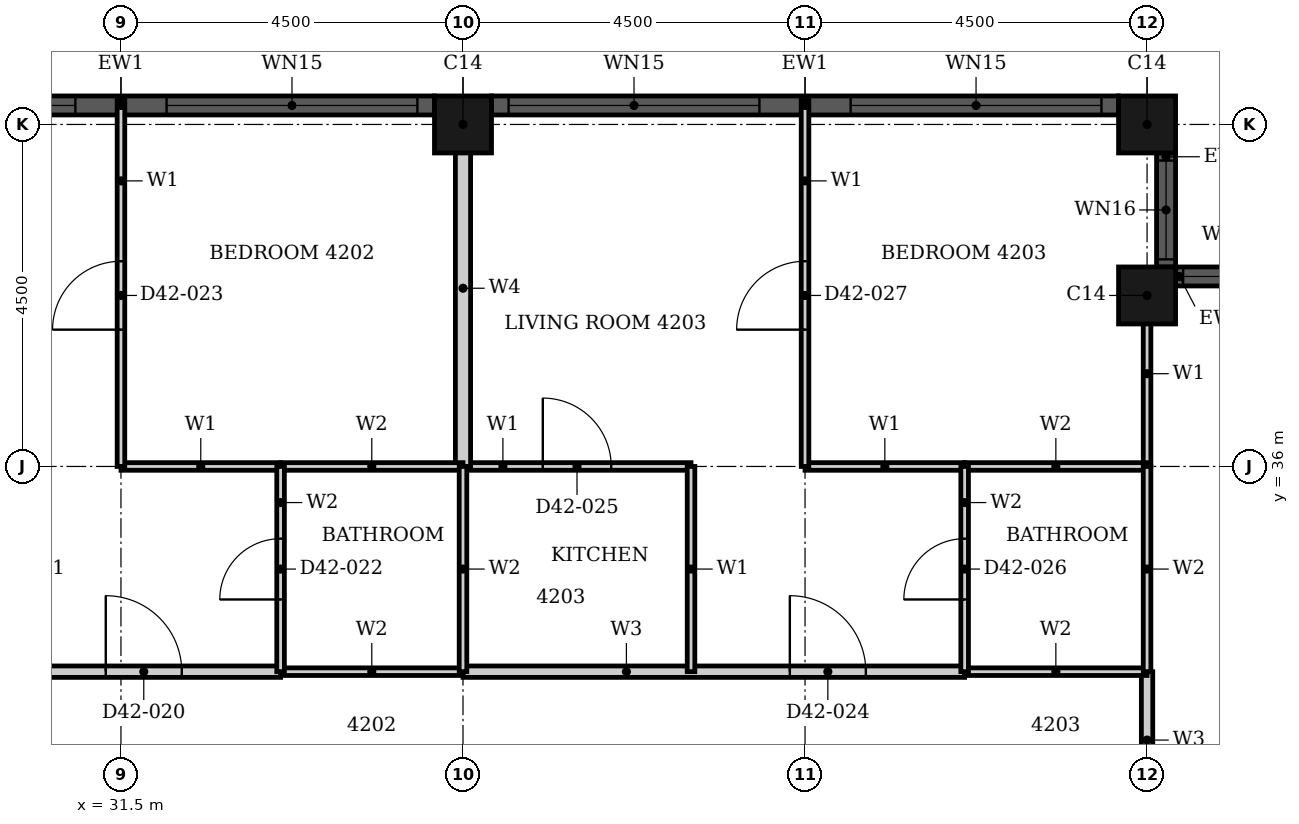
"""IFC4 building model, lengths in metres.
Left out: names, types, materials, properties, quantities, classifications, styles, units other than length and angle.
Written with IfcOpenShell. Run it as: python <this file> out.ifc"""

import sys

from ifc_helpers import new_model, si_unit, direction, frame, frame_2d, origin, origin_2d, place, context, subcontext, project, spatial, rectangle, hollow_rectangle, extrude, element, fill, save


model = new_model("IFC4")
c1 = context("Model", 3, precision=1e-05, world=origin(), true_north=direction((0.0, 1.0)))
c2 = subcontext(c1, "Body", "Model", "MODEL_VIEW")
j1 = project(units=[si_unit("LENGTHUNIT", "METRE"), si_unit("PLANEANGLEUNIT", "RADIAN")], contexts=[c1])
p1 = place(None, origin())
s1 = spatial("IfcSite", under=j1, at=p1, CompositionType="ELEMENT")
p2 = place(p1, origin())
s2 = spatial("IfcBuilding", under=s1, at=p2, CompositionType="ELEMENT")
p3 = place(p2, frame((0.0, 0.0, 169.1)))
s3 = spatial("IfcBuildingStorey", under=s2, at=p3, CompositionType="ELEMENT", Elevation=169.1)
for number, where, z_axis, x_axis in (
    (1, (45.0, 38.25, 0.0), (0.0, 0.0, 1.0), (1.0, 0.0, 0.0)),
    (2, (45.0, 40.5, 0.0), (0.0, 0.0, 1.0), (1.0, 0.0, 0.0)),
    (3, (36.0, 40.5, 0.0), (0.0, 0.0, 1.0), (1.0, 0.0, 0.0)),
):
    element("IfcColumn", number, at=place(p3, frame(where, z_axis=z_axis, x_axis=x_axis)), inside=s3, PredefinedType="COLUMN", context=c2, shape_type="SweptSolid", body=[
        extrude(hollow_rectangle(XDim=0.75, YDim=0.75, WallThickness=0.024, at=origin_2d()), origin(), (0.0, 0.0, 1.0), 3.7),
    ])
p4 = place(p3, frame((46.875, 38.5, 0.0), z_axis=(0.0, 0.0, 1.0), x_axis=(-1.0, 0.0, 0.0)))
e4 = element("IfcWall", 4, at=p4, inside=s3, PredefinedType="SOLIDWALL", context=c2, shape_type="SweptSolid", body=[
    extrude(rectangle(XDim=1.5, YDim=0.25, at=frame_2d((0.75, 0.0))), origin(), (0.0, 0.0, 1.0), 3.7),
])
p5 = place(p4, frame((0.1, 0.0, 0.9)))
e5 = element("IfcOpeningElement", 5, at=p5, cuts=e4, PredefinedType="OPENING", context=c2, shape_type="SweptSolid", body=[
    extrude(rectangle(XDim=1.3, YDim=1.85, at=frame_2d((0.65, 0.925))), frame((0.0, 0.135, 0.0), z_axis=(0.0, -1.0, 0.0), x_axis=(1.0, 0.0, 0.0)), (0.0, 0.0, 1.0), 0.27),
])
p6 = place(p3, frame((45.25, 38.625, 0.0), z_axis=(0.0, 0.0, 1.0), x_axis=(0.0, 1.0, 0.0)))
e6 = element("IfcWall", 6, at=p6, inside=s3, PredefinedType="SOLIDWALL", context=c2, shape_type="SweptSolid", body=[
    extrude(rectangle(XDim=1.5, YDim=0.25, at=frame_2d((0.75, 0.0))), origin(), (0.0, 0.0, 1.0), 3.7),
])
p7 = place(p6, frame((0.1, 0.0, 0.9)))
e7 = element("IfcOpeningElement", 7, at=p7, cuts=e6, PredefinedType="OPENING", context=c2, shape_type="SweptSolid", body=[
    extrude(rectangle(XDim=1.3, YDim=1.85, at=frame_2d((0.65, 0.925))), frame((0.0, 0.135, 0.0), z_axis=(0.0, -1.0, 0.0), x_axis=(1.0, 0.0, 0.0)), (0.0, 0.0, 1.0), 0.27),
])
p8 = place(p3, frame((44.625, 40.75, 0.0), z_axis=(0.0, 0.0, 1.0), x_axis=(-1.0, 0.0, 0.0)))
e8 = element("IfcWall", 8, at=p8, inside=s3, PredefinedType="SOLIDWALL", context=c2, shape_type="SweptSolid", body=[
    extrude(rectangle(XDim=8.25, YDim=0.25, at=frame_2d((4.125, 0.0))), origin(), (0.0, 0.0, 1.0), 3.7),
])
p9 = place(p8, frame((0.225, 0.0, 0.45)))
e9 = element("IfcOpeningElement", 9, at=p9, cuts=e8, PredefinedType="OPENING", context=c2, shape_type="SweptSolid", body=[
    extrude(rectangle(XDim=3.3, YDim=2.3, at=frame_2d((1.65, 1.15))), frame((0.0, 0.135, 0.0), z_axis=(0.0, -1.0, 0.0), x_axis=(1.0, 0.0, 0.0)), (0.0, 0.0, 1.0), 0.27),
])
p10 = place(p8, frame((4.725, 0.0, 0.45)))
e10 = element("IfcOpeningElement", 10, at=p10, cuts=e8, PredefinedType="OPENING", context=c2, shape_type="SweptSolid", body=[
    extrude(rectangle(XDim=3.3, YDim=2.3, at=frame_2d((1.65, 1.15))), frame((0.0, 0.135, 0.0), z_axis=(0.0, -1.0, 0.0), x_axis=(1.0, 0.0, 0.0)), (0.0, 0.0, 1.0), 0.27),
])
p11 = place(p3, frame((35.625, 40.75, 0.0), z_axis=(0.0, 0.0, 1.0), x_axis=(-1.0, 0.0, 0.0)))
e11 = element("IfcWall", 11, at=p11, inside=s3, PredefinedType="SOLIDWALL", context=c2, shape_type="SweptSolid", body=[
    extrude(rectangle(XDim=8.25, YDim=0.25, at=frame_2d((4.125, 0.0))), origin(), (0.0, 0.0, 1.0), 3.7),
])
p12 = place(p11, frame((0.225, 0.0, 0.45)))
e12 = element("IfcOpeningElement", 12, at=p12, cuts=e11, PredefinedType="OPENING", context=c2, shape_type="SweptSolid", body=[
    extrude(rectangle(XDim=3.3, YDim=2.3, at=frame_2d((1.65, 1.15))), frame((0.0, 0.135, 0.0), z_axis=(0.0, -1.0, 0.0), x_axis=(1.0, 0.0, 0.0)), (0.0, 0.0, 1.0), 0.27),
])
p13 = place(p11, frame((4.725, 0.0, 0.45)))
e13 = element("IfcOpeningElement", 13, at=p13, cuts=e11, PredefinedType="OPENING", context=c2, shape_type="SweptSolid", body=[
    extrude(rectangle(XDim=3.3, YDim=2.3, at=frame_2d((1.65, 1.15))), frame((0.0, 0.135, 0.0), z_axis=(0.0, -1.0, 0.0), x_axis=(1.0, 0.0, 0.0)), (0.0, 0.0, 1.0), 0.27),
])
p14 = place(p3, frame((27.0, 33.3, 0.0), z_axis=(0.0, 0.0, 1.0), x_axis=(1.0, 0.0, 0.0)))
e14 = element("IfcWall", 14, at=p14, inside=s3, PredefinedType="PARTITIONING", context=c2, shape_type="SweptSolid", body=[
    extrude(rectangle(XDim=6.6, YDim=0.15, at=frame_2d((3.3, 0.0))), origin(), (0.0, 0.0, 1.0), 3.4),
])
p15 = place(p14, frame((4.3, 0.0, 0.0)))
e15 = element("IfcOpeningElement", 15, at=p15, cuts=e14, PredefinedType="OPENING", context=c2, shape_type="SweptSolid", body=[
    extrude(rectangle(XDim=1.0, YDim=2.2, at=frame_2d((0.5, 1.1))), frame((0.0, 0.085, 0.0), z_axis=(0.0, -1.0, 0.0), x_axis=(1.0, 0.0, 0.0)), (0.0, 0.0, 1.0), 0.17),
])
p16 = place(p3, frame((36.0, 33.3, 0.0), z_axis=(0.0, 0.0, 1.0), x_axis=(1.0, 0.0, 0.0)))
e16 = element("IfcWall", 16, at=p16, inside=s3, PredefinedType="PARTITIONING", context=c2, shape_type="SweptSolid", body=[
    extrude(rectangle(XDim=6.6, YDim=0.15, at=frame_2d((3.3, 0.0))), origin(), (0.0, 0.0, 1.0), 3.4),
])
p17 = place(p16, frame((4.3, 0.0, 0.0)))
e17 = element("IfcOpeningElement", 17, at=p17, cuts=e16, PredefinedType="OPENING", context=c2, shape_type="SweptSolid", body=[
    extrude(rectangle(XDim=1.0, YDim=2.2, at=frame_2d((0.5, 1.1))), frame((0.0, 0.085, 0.0), z_axis=(0.0, -1.0, 0.0), x_axis=(1.0, 0.0, 0.0)), (0.0, 0.0, 1.0), 0.17),
])
p18 = place(p3, frame((45.0, 31.5, 0.0), z_axis=(0.0, 0.0, 1.0), x_axis=(0.0, 1.0, 0.0)))
e18 = element("IfcWall", 18, at=p18, inside=s3, PredefinedType="PARTITIONING", context=c2, shape_type="SweptSolid", body=[
    extrude(rectangle(XDim=1.8, YDim=0.15, at=frame_2d((0.9, 0.0))), origin(), (0.0, 0.0, 1.0), 3.4),
])
for number, where, z_axis, x_axis in (
    (19, (31.5, 36.0, 0.0), (0.0, 0.0, 1.0), (1.0, 0.0, 0.0)),
    (20, (40.5, 36.0, 0.0), (0.0, 0.0, 1.0), (1.0, 0.0, 0.0)),
):
    element("IfcWall", number, at=place(p3, frame(where, z_axis=z_axis, x_axis=x_axis)), inside=s3, PredefinedType="PARTITIONING", context=c2, shape_type="SweptSolid", body=[
        extrude(rectangle(XDim=2.1, YDim=0.1, at=frame_2d((1.05, 0.0))), origin(), (0.0, 0.0, 1.0), 3.4),
    ])
p19 = place(p3, frame((36.0, 36.0, 0.0), z_axis=(0.0, 0.0, 1.0), x_axis=(1.0, 0.0, 0.0)))
e21 = element("IfcWall", 21, at=p19, inside=s3, PredefinedType="PARTITIONING", context=c2, shape_type="SweptSolid", body=[
    extrude(rectangle(XDim=3.0, YDim=0.1, at=frame_2d((1.5, 0.0))), origin(), (0.0, 0.0, 1.0), 3.4),
])
p20 = place(p19, frame((1.05, 0.0, 0.0)))
e22 = element("IfcOpeningElement", 22, at=p20, cuts=e21, PredefinedType="OPENING", context=c2, shape_type="SweptSolid", body=[
    extrude(rectangle(XDim=0.9, YDim=2.1, at=frame_2d((0.45, 1.05))), frame((0.0, 0.06, 0.0), z_axis=(0.0, -1.0, 0.0), x_axis=(1.0, 0.0, 0.0)), (0.0, 0.0, 1.0), 0.12),
])
p21 = place(p3, frame((31.5, 36.0, 0.0), z_axis=(0.0, 0.0, 1.0), x_axis=(0.0, 1.0, 0.0)))
e23 = element("IfcWall", 23, at=p21, inside=s3, PredefinedType="PARTITIONING", context=c2, shape_type="SweptSolid", body=[
    extrude(rectangle(XDim=4.815, YDim=0.1, at=frame_2d((2.407, 0.0))), origin(), (0.0, 0.0, 1.0), 3.4),
])
p22 = place(p21, frame((1.8, 0.0, 0.0)))
e24 = element("IfcOpeningElement", 24, at=p22, cuts=e23, PredefinedType="OPENING", context=c2, shape_type="SweptSolid", body=[
    extrude(rectangle(XDim=0.9, YDim=2.1, at=frame_2d((0.45, 1.05))), frame((0.0, 0.06, 0.0), z_axis=(0.0, -1.0, 0.0), x_axis=(1.0, 0.0, 0.0)), (0.0, 0.0, 1.0), 0.12),
])
p23 = place(p3, frame((39.0, 33.3, 0.0), z_axis=(0.0, 0.0, 1.0), x_axis=(0.0, 1.0, 0.0)))
e25 = element("IfcWall", 25, at=p23, inside=s3, PredefinedType="PARTITIONING", context=c2, shape_type="SweptSolid", body=[
    extrude(rectangle(XDim=2.7, YDim=0.1, at=frame_2d((1.35, 0.0))), origin(), (0.0, 0.0, 1.0), 3.4),
])
p24 = place(p3, frame((40.5, 36.0, 0.0), z_axis=(0.0, 0.0, 1.0), x_axis=(0.0, 1.0, 0.0)))
e26 = element("IfcWall", 26, at=p24, inside=s3, PredefinedType="PARTITIONING", context=c2, shape_type="SweptSolid", body=[
    extrude(rectangle(XDim=4.815, YDim=0.1, at=frame_2d((2.407, 0.0))), origin(), (0.0, 0.0, 1.0), 3.4),
])
p25 = place(p24, frame((1.8, 0.0, 0.0)))
e27 = element("IfcOpeningElement", 27, at=p25, cuts=e26, PredefinedType="OPENING", context=c2, shape_type="SweptSolid", body=[
    extrude(rectangle(XDim=0.9, YDim=2.1, at=frame_2d((0.45, 1.05))), frame((0.0, 0.06, 0.0), z_axis=(0.0, -1.0, 0.0), x_axis=(1.0, 0.0, 0.0)), (0.0, 0.0, 1.0), 0.12),
])
p26 = place(p3, frame((45.0, 36.001, 0.0), z_axis=(0.0, 0.0, 1.0), x_axis=(0.0, 1.0, 0.0)))
e28 = element("IfcWall", 28, at=p26, inside=s3, PredefinedType="PARTITIONING", context=c2, shape_type="SweptSolid", body=[
    extrude(rectangle(XDim=2.439, YDim=0.1, at=frame_2d((1.219, 0.0))), origin(), (0.0, 0.0, 1.0), 3.4),
])
p27 = place(p3, frame((36.0, 36.0, 0.0), z_axis=(0.0, 0.0, 1.0), x_axis=(0.0, 1.0, 0.0)))
e29 = element("IfcWall", 29, at=p27, inside=s3, PredefinedType="PARTITIONING", context=c2, shape_type="SweptSolid", body=[
    extrude(rectangle(XDim=4.69, YDim=0.2, at=frame_2d((2.345, 0.0))), origin(), (0.0, 0.0, 1.0), 3.4),
])
for number, where, z_axis, x_axis in (
    (30, (33.6, 33.3, 0.0), (0.0, 0.0, 1.0), (1.0, 0.0, 0.0)),
    (31, (42.6, 33.3, 0.0), (0.0, 0.0, 1.0), (1.0, 0.0, 0.0)),
    (32, (33.6, 36.0, 0.0), (0.0, 0.0, 1.0), (1.0, 0.0, 0.0)),
    (33, (42.6, 36.0, 0.0), (0.0, 0.0, 1.0), (1.0, 0.0, 0.0)),
):
    element("IfcWall", number, at=place(p3, frame(where, z_axis=z_axis, x_axis=x_axis)), inside=s3, PredefinedType="PARTITIONING", context=c2, shape_type="SweptSolid", body=[
        extrude(rectangle(XDim=2.4, YDim=0.1, at=frame_2d((1.2, 0.0))), origin(), (0.0, 0.0, 1.0), 3.4),
    ])
p28 = place(p3, frame((33.6, 33.3, 0.0), z_axis=(0.0, 0.0, 1.0), x_axis=(0.0, 1.0, 0.0)))
e34 = element("IfcWall", 34, at=p28, inside=s3, PredefinedType="PARTITIONING", context=c2, shape_type="SweptSolid", body=[
    extrude(rectangle(XDim=2.7, YDim=0.1, at=frame_2d((1.35, 0.0))), origin(), (0.0, 0.0, 1.0), 3.4),
])
p29 = place(p28, frame((0.95, 0.0, 0.0)))
e35 = element("IfcOpeningElement", 35, at=p29, cuts=e34, PredefinedType="OPENING", context=c2, shape_type="SweptSolid", body=[
    extrude(rectangle(XDim=0.8, YDim=2.1, at=frame_2d((0.4, 1.05))), frame((0.0, 0.06, 0.0), z_axis=(0.0, -1.0, 0.0), x_axis=(1.0, 0.0, 0.0)), (0.0, 0.0, 1.0), 0.12),
])
p30 = place(p3, frame((36.0, 33.3, 0.0), z_axis=(0.0, 0.0, 1.0), x_axis=(0.0, 1.0, 0.0)))
e36 = element("IfcWall", 36, at=p30, inside=s3, PredefinedType="PARTITIONING", context=c2, shape_type="SweptSolid", body=[
    extrude(rectangle(XDim=2.7, YDim=0.1, at=frame_2d((1.35, 0.0))), origin(), (0.0, 0.0, 1.0), 3.4),
])
p31 = place(p3, frame((42.6, 33.3, 0.0), z_axis=(0.0, 0.0, 1.0), x_axis=(0.0, 1.0, 0.0)))
e37 = element("IfcWall", 37, at=p31, inside=s3, PredefinedType="PARTITIONING", context=c2, shape_type="SweptSolid", body=[
    extrude(rectangle(XDim=2.7, YDim=0.1, at=frame_2d((1.35, 0.0))), origin(), (0.0, 0.0, 1.0), 3.4),
])
p32 = place(p31, frame((0.95, 0.0, 0.0)))
e38 = element("IfcOpeningElement", 38, at=p32, cuts=e37, PredefinedType="OPENING", context=c2, shape_type="SweptSolid", body=[
    extrude(rectangle(XDim=0.8, YDim=2.1, at=frame_2d((0.4, 1.05))), frame((0.0, 0.06, 0.0), z_axis=(0.0, -1.0, 0.0), x_axis=(1.0, 0.0, 0.0)), (0.0, 0.0, 1.0), 0.12),
])
p33 = place(p3, frame((45.0, 33.3, 0.0), z_axis=(0.0, 0.0, 1.0), x_axis=(0.0, 1.0, 0.0)))
e39 = element("IfcWall", 39, at=p33, inside=s3, PredefinedType="PARTITIONING", context=c2, shape_type="SweptSolid", body=[
    extrude(rectangle(XDim=2.7, YDim=0.1, at=frame_2d((1.35, 0.0))), origin(), (0.0, 0.0, 1.0), 3.4),
])
p34 = place(p5, origin())
e40 = element("IfcWindow", 40, at=p34, inside=s3, PartitioningType="SINGLE_PANEL", PredefinedType="WINDOW", context=c2, shape_type="SweptSolid", body=[
    extrude(rectangle(XDim=1.3, YDim=1.85, at=frame_2d((0.65, 0.925))), frame((0.0, 0.03, 0.0), z_axis=(0.0, -1.0, 0.0), x_axis=(1.0, 0.0, 0.0)), (0.0, 0.0, 1.0), 0.06),
])
fill(e5, e40)
p35 = place(p7, origin())
e41 = element("IfcWindow", 41, at=p35, inside=s3, PartitioningType="SINGLE_PANEL", PredefinedType="WINDOW", context=c2, shape_type="SweptSolid", body=[
    extrude(rectangle(XDim=1.3, YDim=1.85, at=frame_2d((0.65, 0.925))), frame((0.0, 0.03, 0.0), z_axis=(0.0, -1.0, 0.0), x_axis=(1.0, 0.0, 0.0)), (0.0, 0.0, 1.0), 0.06),
])
fill(e7, e41)
p36 = place(p9, origin())
e42 = element("IfcWindow", 42, at=p36, inside=s3, PartitioningType="SINGLE_PANEL", PredefinedType="WINDOW", context=c2, shape_type="SweptSolid", body=[
    extrude(rectangle(XDim=3.3, YDim=2.3, at=frame_2d((1.65, 1.15))), frame((0.0, 0.03, 0.0), z_axis=(0.0, -1.0, 0.0), x_axis=(1.0, 0.0, 0.0)), (0.0, 0.0, 1.0), 0.06),
])
fill(e9, e42)
p37 = place(p10, origin())
e43 = element("IfcWindow", 43, at=p37, inside=s3, PartitioningType="SINGLE_PANEL", PredefinedType="WINDOW", context=c2, shape_type="SweptSolid", body=[
    extrude(rectangle(XDim=3.3, YDim=2.3, at=frame_2d((1.65, 1.15))), frame((0.0, 0.03, 0.0), z_axis=(0.0, -1.0, 0.0), x_axis=(1.0, 0.0, 0.0)), (0.0, 0.0, 1.0), 0.06),
])
fill(e10, e43)
p38 = place(p12, origin())
e44 = element("IfcWindow", 44, at=p38, inside=s3, PartitioningType="SINGLE_PANEL", PredefinedType="WINDOW", context=c2, shape_type="SweptSolid", body=[
    extrude(rectangle(XDim=3.3, YDim=2.3, at=frame_2d((1.65, 1.15))), frame((0.0, 0.03, 0.0), z_axis=(0.0, -1.0, 0.0), x_axis=(1.0, 0.0, 0.0)), (0.0, 0.0, 1.0), 0.06),
])
fill(e12, e44)
p39 = place(p13, origin())
e45 = element("IfcWindow", 45, at=p39, inside=s3, PartitioningType="SINGLE_PANEL", PredefinedType="WINDOW", context=c2, shape_type="SweptSolid", body=[
    extrude(rectangle(XDim=3.3, YDim=2.3, at=frame_2d((1.65, 1.15))), frame((0.0, 0.03, 0.0), z_axis=(0.0, -1.0, 0.0), x_axis=(1.0, 0.0, 0.0)), (0.0, 0.0, 1.0), 0.06),
])
fill(e13, e45)
p40 = place(p15, origin())
e46 = element("IfcDoor", 46, at=p40, inside=s3, OperationType="SINGLE_SWING_RIGHT", PredefinedType="DOOR", context=c2, shape_type="SweptSolid", body=[
    extrude(rectangle(XDim=1.0, YDim=2.2, at=frame_2d((0.5, 1.1))), frame((0.0, 0.025, 0.0), z_axis=(0.0, -1.0, 0.0), x_axis=(1.0, 0.0, 0.0)), (0.0, 0.0, 1.0), 0.05),
])
fill(e15, e46)
p41 = place(p29, origin())
e47 = element("IfcDoor", 47, at=p41, inside=s3, OperationType="SINGLE_SWING_RIGHT", PredefinedType="DOOR", context=c2, shape_type="SweptSolid", body=[
    extrude(rectangle(XDim=0.8, YDim=2.1, at=frame_2d((0.4, 1.05))), frame((0.0, 0.025, 0.0), z_axis=(0.0, -1.0, 0.0), x_axis=(1.0, 0.0, 0.0)), (0.0, 0.0, 1.0), 0.05),
])
fill(e35, e47)
p42 = place(p22, origin())
e48 = element("IfcDoor", 48, at=p42, inside=s3, OperationType="SINGLE_SWING_RIGHT", PredefinedType="DOOR", context=c2, shape_type="SweptSolid", body=[
    extrude(rectangle(XDim=0.9, YDim=2.1, at=frame_2d((0.45, 1.05))), frame((0.0, 0.025, 0.0), z_axis=(0.0, -1.0, 0.0), x_axis=(1.0, 0.0, 0.0)), (0.0, 0.0, 1.0), 0.05),
])
fill(e24, e48)
p43 = place(p17, origin())
e49 = element("IfcDoor", 49, at=p43, inside=s3, OperationType="SINGLE_SWING_LEFT", PredefinedType="DOOR", context=c2, shape_type="SweptSolid", body=[
    extrude(rectangle(XDim=1.0, YDim=2.2, at=frame_2d((0.5, 1.1))), frame((0.0, 0.025, 0.0), z_axis=(0.0, -1.0, 0.0), x_axis=(1.0, 0.0, 0.0)), (0.0, 0.0, 1.0), 0.05),
])
fill(e17, e49)
p44 = place(p20, origin())
e50 = element("IfcDoor", 50, at=p44, inside=s3, OperationType="SINGLE_SWING_RIGHT", PredefinedType="DOOR", context=c2, shape_type="SweptSolid", body=[
    extrude(rectangle(XDim=0.9, YDim=2.1, at=frame_2d((0.45, 1.05))), frame((0.0, 0.025, 0.0), z_axis=(0.0, -1.0, 0.0), x_axis=(1.0, 0.0, 0.0)), (0.0, 0.0, 1.0), 0.05),
])
fill(e22, e50)
p45 = place(p32, origin())
e51 = element("IfcDoor", 51, at=p45, inside=s3, OperationType="SINGLE_SWING_LEFT", PredefinedType="DOOR", context=c2, shape_type="SweptSolid", body=[
    extrude(rectangle(XDim=0.8, YDim=2.1, at=frame_2d((0.4, 1.05))), frame((0.0, 0.025, 0.0), z_axis=(0.0, -1.0, 0.0), x_axis=(1.0, 0.0, 0.0)), (0.0, 0.0, 1.0), 0.05),
])
fill(e38, e51)
p46 = place(p25, origin())
e52 = element("IfcDoor", 52, at=p46, inside=s3, OperationType="SINGLE_SWING_RIGHT", PredefinedType="DOOR", context=c2, shape_type="SweptSolid", body=[
    extrude(rectangle(XDim=0.9, YDim=2.1, at=frame_2d((0.45, 1.05))), frame((0.0, 0.025, 0.0), z_axis=(0.0, -1.0, 0.0), x_axis=(1.0, 0.0, 0.0)), (0.0, 0.0, 1.0), 0.05),
])
fill(e27, e52)
save(model, sys.argv[1])
